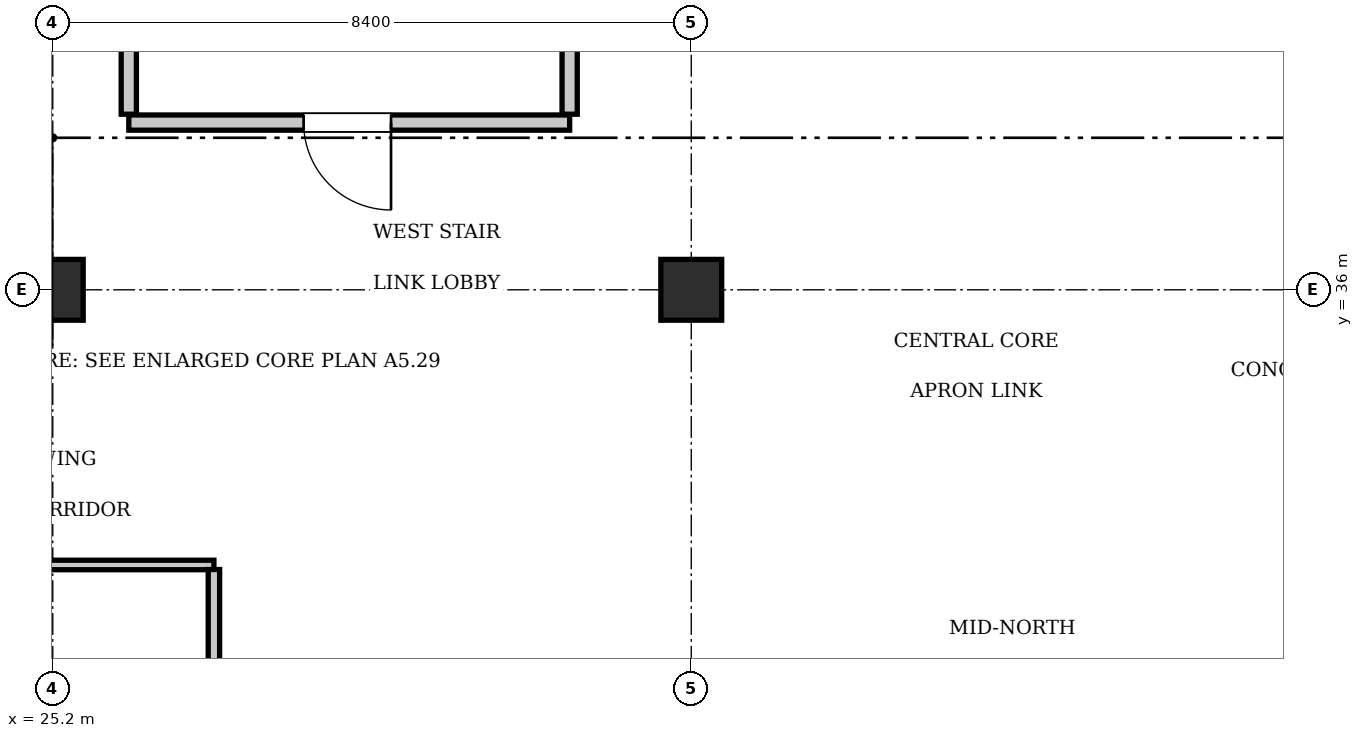
"""IFC4 building model, lengths in metres.
Left out: names, types, materials, properties, quantities, classifications, styles, units other than length and angle.
Written with IfcOpenShell. Run it as: python <this file> out.ifc"""

import sys

from ifc_helpers import new_model, si_unit, direction, frame, frame_2d, origin, origin_2d, place, context, subcontext, project, spatial, rectangle, extrude, element, fill, save


model = new_model("IFC4")
c1 = context("Model", 3, precision=1e-05, world=origin(), true_north=direction((0.0, 1.0)))
c2 = subcontext(c1, "Body", "Model", "MODEL_VIEW")
j1 = project(units=[si_unit("LENGTHUNIT", "METRE"), si_unit("PLANEANGLEUNIT", "RADIAN")], contexts=[c1])
p1 = place(None, origin())
s1 = spatial("IfcSite", under=j1, at=p1, CompositionType="ELEMENT")
p2 = place(p1, origin())
s2 = spatial("IfcBuilding", under=s1, at=p2, CompositionType="ELEMENT")
p3 = place(p2, frame((0.0, 0.0, 262.5)))
s3 = spatial("IfcBuildingStorey", under=s2, at=p3, CompositionType="ELEMENT", Elevation=262.5)
for number, where, z_axis, x_axis in (
    (1, (25.2, 36.0, 0.0), (0.0, 0.0, 1.0), (1.0, 0.0, 0.0)),
    (2, (33.6, 36.0, 0.0), (0.0, 0.0, 1.0), (1.0, 0.0, 0.0)),
):
    element("IfcColumn", number, at=place(p3, frame(where, z_axis=z_axis, x_axis=x_axis)), inside=s3, PredefinedType="COLUMN", context=c2, shape_type="SweptSolid", body=[
        extrude(rectangle(XDim=0.8, YDim=0.8, at=origin_2d()), origin(), (0.0, 0.0, 1.0), 3.85),
    ])
p4 = place(p3, frame((26.2, 38.2, 0.0), z_axis=(0.0, 0.0, 1.0), x_axis=(1.0, 0.0, 0.0)))
e3 = element("IfcWall", 3, at=p4, inside=s3, PredefinedType="PARTITIONING", context=c2, shape_type="SweptSolid", body=[
    extrude(rectangle(XDim=5.8, YDim=0.2, at=frame_2d((2.9, 0.0))), origin(), (0.0, 0.0, 1.0), 3.61),
])
p5 = place(p4, frame((2.3, 0.0, 0.0)))
e4 = element("IfcOpeningElement", 4, at=p5, cuts=e3, PredefinedType="OPENING", context=c2, shape_type="SweptSolid", body=[
    extrude(rectangle(XDim=1.15, YDim=2.15, at=frame_2d((0.575, 1.075))), frame((0.0, 0.11, 0.0), z_axis=(0.0, -1.0, 0.0), x_axis=(1.0, 0.0, 0.0)), (0.0, 0.0, 1.0), 0.22),
])
for number, where, z_axis, x_axis in (
    (5, (26.2, 38.31, 0.0), (0.0, 0.0, 1.0), (0.0, 1.0, 0.0)),
    (6, (32.0, 38.31, 0.0), (0.0, 0.0, 1.0), (0.0, 1.0, 0.0)),
):
    element("IfcWall", number, at=place(p3, frame(where, z_axis=z_axis, x_axis=x_axis)), inside=s3, PredefinedType="PARTITIONING", context=c2, shape_type="SweptSolid", body=[
        extrude(rectangle(XDim=3.07, YDim=0.2, at=frame_2d((1.535, 0.0))), origin(), (0.0, 0.0, 1.0), 3.61),
    ])
p6 = place(p3, frame((15.5, 32.38, 0.0), z_axis=(0.0, 0.0, 1.0), x_axis=(1.0, 0.0, 0.0)))
e7 = element("IfcWall", 7, at=p6, inside=s3, PredefinedType="PARTITIONING", context=c2, shape_type="SweptSolid", body=[
    extrude(rectangle(XDim=11.82, YDim=0.125, at=frame_2d((5.91, 0.0))), origin(), (0.0, 0.0, 1.0), 3.61),
])
p7 = place(p3, frame((27.32, 30.24, 0.0), z_axis=(0.0, 0.0, 1.0), x_axis=(0.0, 1.0, 0.0)))
e8 = element("IfcWall", 8, at=p7, inside=s3, PredefinedType="PARTITIONING", context=c2, shape_type="SweptSolid", body=[
    extrude(rectangle(XDim=2.08, YDim=0.15, at=frame_2d((1.04, 0.0))), origin(), (0.0, 0.0, 1.0), 3.61),
])
p8 = place(p5, frame((1.15, 0.0, 0.0), z_axis=(0.0, 0.0, 1.0), x_axis=(-1.0, 0.0, 0.0)))
e9 = element("IfcDoor", 9, at=p8, inside=s3, OperationType="SINGLE_SWING_LEFT", PredefinedType="DOOR", context=c2, shape_type="SweptSolid", body=[
    extrude(rectangle(XDim=1.15, YDim=2.15, at=frame_2d((0.575, 1.075))), frame((0.0, 0.025, 0.0), z_axis=(0.0, -1.0, 0.0), x_axis=(1.0, 0.0, 0.0)), (0.0, 0.0, 1.0), 0.05),
])
fill(e4, e9)
save(model, sys.argv[1])
